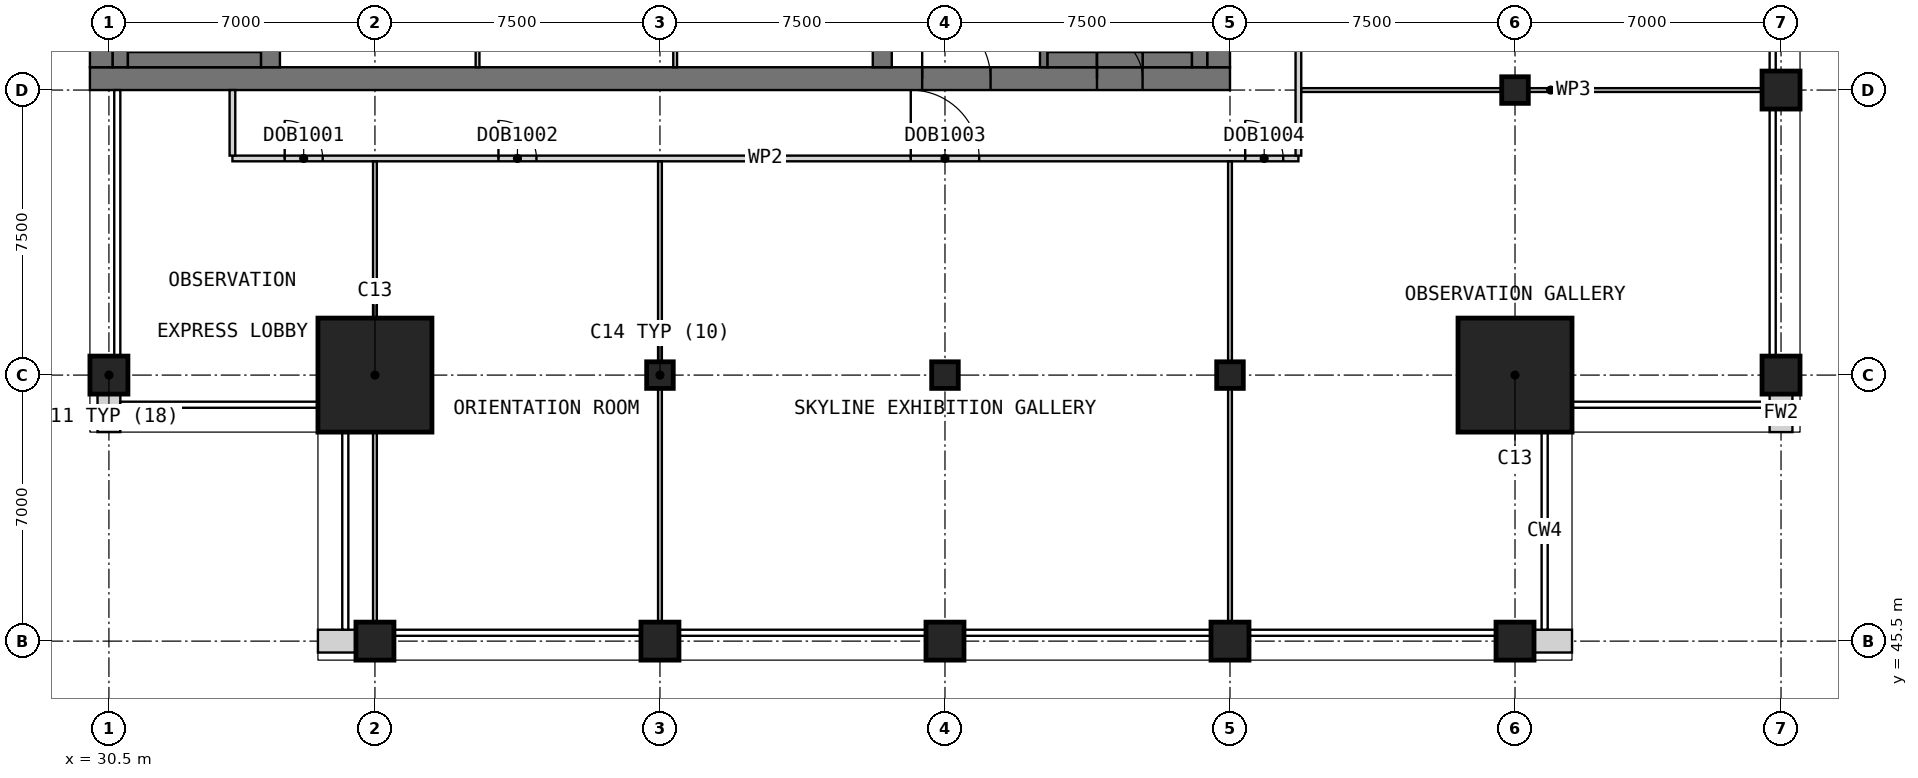
"""IFC4 building model, lengths in metres.
Left out: names, types, materials, properties, quantities, classifications, styles, units other than length and angle.
Written with IfcOpenShell. Run it as: python <this file> out.ifc"""

import sys

from ifc_helpers import new_model, si_unit, direction, frame, frame_2d, origin, origin_2d, place, context, subcontext, project, spatial, rectangle, extrude, element, fill, save


model = new_model("IFC4")
c1 = context("Model", 3, precision=1e-05, world=origin(), true_north=direction((0.0, 1.0)))
c2 = subcontext(c1, "Body", "Model", "MODEL_VIEW")
j1 = project(units=[si_unit("LENGTHUNIT", "METRE"), si_unit("PLANEANGLEUNIT", "RADIAN")], contexts=[c1])
p1 = place(None, origin())
s1 = spatial("IfcSite", under=j1, at=p1, CompositionType="ELEMENT")
p2 = place(p1, origin())
s2 = spatial("IfcBuilding", under=s1, at=p2, CompositionType="ELEMENT")
p3 = place(p2, frame((0.0, 0.0, 302.7)))
s3 = spatial("IfcBuildingStorey", under=s2, at=p3, CompositionType="ELEMENT", Elevation=302.7)
for number, where, z_axis, x_axis in (
    (1, (30.5, 52.5, 0.0), (0.0, 0.0, 1.0), (1.0, 0.0, 0.0)),
    (2, (37.5, 45.5, 0.0), (0.0, 0.0, 1.0), (1.0, 0.0, 0.0)),
    (3, (45.0, 45.5, 0.0), (0.0, 0.0, 1.0), (1.0, 0.0, 0.0)),
):
    element("IfcColumn", number, at=place(p3, frame(where, z_axis=z_axis, x_axis=x_axis)), inside=s3, PredefinedType="COLUMN", context=c2, shape_type="SweptSolid", body=[
        extrude(rectangle(XDim=1.0, YDim=1.0, at=origin_2d()), origin(), (0.0, 0.0, 1.0), 6.0),
    ])
p4 = place(p3, frame((45.0, 52.5, 0.0), z_axis=(0.0, 0.0, 1.0), x_axis=(1.0, 0.0, 0.0)))
e4 = element("IfcColumn", 4, at=p4, inside=s3, PredefinedType="COLUMN", context=c2, shape_type="SweptSolid", body=[
    extrude(rectangle(XDim=0.7, YDim=0.7, at=origin_2d()), origin(), (0.0, 0.0, 1.0), 6.0),
])
p5 = place(p3, frame((52.5, 45.5, 0.0), z_axis=(0.0, 0.0, 1.0), x_axis=(1.0, 0.0, 0.0)))
e5 = element("IfcColumn", 5, at=p5, inside=s3, PredefinedType="COLUMN", context=c2, shape_type="SweptSolid", body=[
    extrude(rectangle(XDim=1.0, YDim=1.0, at=origin_2d()), origin(), (0.0, 0.0, 1.0), 6.0),
])
p6 = place(p3, frame((52.5, 52.5, 0.0), z_axis=(0.0, 0.0, 1.0), x_axis=(1.0, 0.0, 0.0)))
e6 = element("IfcColumn", 6, at=p6, inside=s3, PredefinedType="COLUMN", context=c2, shape_type="SweptSolid", body=[
    extrude(rectangle(XDim=0.7, YDim=0.7, at=origin_2d()), origin(), (0.0, 0.0, 1.0), 6.0),
])
p7 = place(p3, frame((60.0, 45.5, 0.0), z_axis=(0.0, 0.0, 1.0), x_axis=(1.0, 0.0, 0.0)))
e7 = element("IfcColumn", 7, at=p7, inside=s3, PredefinedType="COLUMN", context=c2, shape_type="SweptSolid", body=[
    extrude(rectangle(XDim=1.0, YDim=1.0, at=origin_2d()), origin(), (0.0, 0.0, 1.0), 6.0),
])
p8 = place(p3, frame((60.0, 52.5, 0.0), z_axis=(0.0, 0.0, 1.0), x_axis=(1.0, 0.0, 0.0)))
e8 = element("IfcColumn", 8, at=p8, inside=s3, PredefinedType="COLUMN", context=c2, shape_type="SweptSolid", body=[
    extrude(rectangle(XDim=0.7, YDim=0.7, at=origin_2d()), origin(), (0.0, 0.0, 1.0), 6.0),
])
p9 = place(p3, frame((67.5, 45.5, 0.0), z_axis=(0.0, 0.0, 1.0), x_axis=(1.0, 0.0, 0.0)))
e9 = element("IfcColumn", 9, at=p9, inside=s3, PredefinedType="COLUMN", context=c2, shape_type="SweptSolid", body=[
    extrude(rectangle(XDim=1.0, YDim=1.0, at=origin_2d()), origin(), (0.0, 0.0, 1.0), 6.0),
])
p10 = place(p3, frame((67.5, 60.0, 0.0), z_axis=(0.0, 0.0, 1.0), x_axis=(1.0, 0.0, 0.0)))
e10 = element("IfcColumn", 10, at=p10, inside=s3, PredefinedType="COLUMN", context=c2, shape_type="SweptSolid", body=[
    extrude(rectangle(XDim=0.7, YDim=0.7, at=origin_2d()), origin(), (0.0, 0.0, 1.0), 6.0),
])
for number, where, z_axis, x_axis in (
    (11, (74.5, 52.5, 0.0), (0.0, 0.0, 1.0), (1.0, 0.0, 0.0)),
    (12, (74.5, 60.0, 0.0), (0.0, 0.0, 1.0), (1.0, 0.0, 0.0)),
):
    element("IfcColumn", number, at=place(p3, frame(where, z_axis=z_axis, x_axis=x_axis)), inside=s3, PredefinedType="COLUMN", context=c2, shape_type="SweptSolid", body=[
        extrude(rectangle(XDim=1.0, YDim=1.0, at=origin_2d()), origin(), (0.0, 0.0, 1.0), 6.0),
    ])
for number, where, z_axis, x_axis in (
    (13, (37.5, 52.5, 0.0), (0.0, 0.0, 1.0), (1.0, 0.0, 0.0)),
    (14, (67.5, 52.5, 0.0), (0.0, 0.0, 1.0), (1.0, 0.0, 0.0)),
):
    element("IfcColumn", number, at=place(p3, frame(where, z_axis=z_axis, x_axis=x_axis)), inside=s3, PredefinedType="COLUMN", context=c2, shape_type="SweptSolid", body=[
        extrude(rectangle(XDim=3.0, YDim=3.0, at=origin_2d()), origin(), (0.0, 0.0, 1.0), 6.0),
    ])
p11 = place(p3, frame((30.0, 60.3, 0.0), z_axis=(0.0, 0.0, 1.0), x_axis=(1.0, 0.0, 0.0)))
e15 = element("IfcWall", 15, at=p11, inside=s3, PredefinedType="SHEAR", context=c2, shape_type="SweptSolid", body=[
    extrude(rectangle(XDim=30.0, YDim=0.6, at=frame_2d((15.0, 0.0))), origin(), (0.0, 0.0, 1.0), 6.0),
])
p12 = place(p11, frame((21.9, 0.0, 0.0)))
e16 = element("IfcOpeningElement", 16, at=p12, cuts=e15, PredefinedType="OPENING", context=c2, shape_type="SweptSolid", body=[
    extrude(rectangle(XDim=1.8, YDim=2.1, at=frame_2d((0.9, 1.05))), frame((0.0, 0.31, 0.0), z_axis=(0.0, -1.0, 0.0), x_axis=(1.0, 0.0, 0.0)), (0.0, 0.0, 1.0), 0.62),
])
p13 = place(p11, frame((26.5, 0.0, 0.0)))
e17 = element("IfcOpeningElement", 17, at=p13, cuts=e15, PredefinedType="OPENING", context=c2, shape_type="SweptSolid", body=[
    extrude(rectangle(XDim=1.2, YDim=2.1, at=frame_2d((0.6, 1.05))), frame((0.0, 0.31, 0.0), z_axis=(0.0, -1.0, 0.0), x_axis=(1.0, 0.0, 0.0)), (0.0, 0.0, 1.0), 0.62),
])
p14 = place(p3, frame((30.3, 60.6, 0.0), z_axis=(0.0, 0.0, 1.0), x_axis=(0.0, 1.0, 0.0)))
e18 = element("IfcWall", 18, at=p14, inside=s3, PredefinedType="SHEAR", context=c2, shape_type="SweptSolid", body=[
    extrude(rectangle(XDim=21.3, YDim=0.6, at=frame_2d((10.65, 0.0))), origin(), (0.0, 0.0, 1.0), 6.0),
])
p15 = place(p3, frame((59.7, 60.6, 0.0), z_axis=(0.0, 0.0, 1.0), x_axis=(0.0, 1.0, 0.0)))
e19 = element("IfcWall", 19, at=p15, inside=s3, PredefinedType="SHEAR", context=c2, shape_type="SweptSolid", body=[
    extrude(rectangle(XDim=21.3, YDim=0.6, at=frame_2d((10.65, 0.0))), origin(), (0.0, 0.0, 1.0), 6.0),
])
p16 = place(p15, frame((14.9, 0.0, 0.0)))
e20 = element("IfcOpeningElement", 20, at=p16, cuts=e19, PredefinedType="OPENING", context=c2, shape_type="SweptSolid", body=[
    extrude(rectangle(XDim=1.8, YDim=2.1, at=frame_2d((0.9, 1.05))), frame((0.0, 0.31, 0.0), z_axis=(0.0, -1.0, 0.0), x_axis=(1.0, 0.0, 0.0)), (0.0, 0.0, 1.0), 0.62),
])
for number, where, z_axis, x_axis in (
    (21, (34.75, 60.6, 0.0), (0.0, 0.0, 1.0), (0.0, 1.0, 0.0)),
    (22, (50.85, 60.6, 0.0), (0.0, 0.0, 1.0), (0.0, 1.0, 0.0)),
):
    element("IfcWall", number, at=place(p3, frame(where, z_axis=z_axis, x_axis=x_axis)), inside=s3, PredefinedType="SHEAR", context=c2, shape_type="SweptSolid", body=[
        extrude(rectangle(XDim=3.6, YDim=0.5, at=frame_2d((1.8, 0.0))), origin(), (0.0, 0.0, 1.0), 6.0),
    ])
for number, where, z_axis, x_axis in (
    (23, (36.0, 45.5, 0.0), (0.0, 0.0, 1.0), (1.0, 0.0, 0.0)),
    (24, (68.0, 45.5, 0.0), (0.0, 0.0, 1.0), (1.0, 0.0, 0.0)),
    (25, (74.5, 51.0, 0.0), (0.0, 0.0, 1.0), (0.0, 1.0, 0.0)),
    (26, (30.5, 52.0, 0.0), (0.0, 0.0, 1.0), (0.0, -1.0, 0.0)),
):
    element("IfcWall", number, at=place(p3, frame(where, z_axis=z_axis, x_axis=x_axis)), inside=s3, PredefinedType="SOLIDWALL", context=c2, shape_type="SweptSolid", body=[
        extrude(rectangle(XDim=1.0, YDim=0.6, at=frame_2d((0.5, 0.0))), origin(), (0.0, 0.0, 1.0), 5.7),
    ])
for number, where, z_axis, x_axis in (
    (27, (40.2, 60.6, 0.0), (0.0, 0.0, 1.0), (0.0, 1.0, 0.0)),
    (28, (45.4, 60.6, 0.0), (0.0, 0.0, 1.0), (0.0, 1.0, 0.0)),
):
    element("IfcWall", number, at=place(p3, frame(where, z_axis=z_axis, x_axis=x_axis)), inside=s3, PredefinedType="PARTITIONING", context=c2, shape_type="SweptSolid", body=[
        extrude(rectangle(XDim=3.4, YDim=0.1, at=frame_2d((1.7, 0.0))), origin(), (0.0, 0.0, 1.0), 5.7),
    ])
p17 = place(p3, frame((55.1, 60.6, 0.0), z_axis=(0.0, 0.0, 1.0), x_axis=(0.0, 1.0, 0.0)))
e29 = element("IfcWall", 29, at=p17, inside=s3, PredefinedType="SOLIDWALL", context=c2, shape_type="SweptSolid", body=[
    extrude(rectangle(XDim=8.0, YDim=0.2, at=frame_2d((4.0, 0.0))), origin(), (0.0, 0.0, 1.0), 5.7),
])
p18 = place(p3, frame((30.8, 60.6, 0.0), z_axis=(0.0, 0.0, 1.0), x_axis=(0.0, 1.0, 0.0)))
e30 = element("IfcWall", 30, at=p18, inside=s3, PredefinedType="SOLIDWALL", context=c2, shape_type="SweptSolid", body=[
    extrude(rectangle(XDim=21.3, YDim=0.4, at=frame_2d((10.65, 0.0))), origin(), (0.0, 0.0, 1.0), 5.7),
])
p19 = place(p3, frame((31.0, 60.8, 0.0), z_axis=(0.0, 0.0, 1.0), x_axis=(1.0, 0.0, 0.0)))
e31 = element("IfcWall", 31, at=p19, inside=s3, PredefinedType="SOLIDWALL", context=c2, shape_type="SweptSolid", body=[
    extrude(rectangle(XDim=3.5, YDim=0.4, at=frame_2d((1.75, 0.0))), origin(), (0.0, 0.0, 1.0), 5.7),
])
for number, where, z_axis, x_axis in (
    (32, (55.2, 60.8, 0.0), (0.0, 0.0, 1.0), (1.0, 0.0, 0.0)),
    (33, (57.7, 60.8, 0.0), (0.0, 0.0, 1.0), (1.0, 0.0, 0.0)),
):
    element("IfcWall", number, at=place(p3, frame(where, z_axis=z_axis, x_axis=x_axis)), inside=s3, PredefinedType="SOLIDWALL", context=c2, shape_type="SweptSolid", body=[
        extrude(rectangle(XDim=1.3, YDim=0.4, at=frame_2d((0.65, 0.0))), origin(), (0.0, 0.0, 1.0), 5.7),
    ])
p20 = place(p3, frame((59.2, 60.6, 0.0), z_axis=(0.0, 0.0, 1.0), x_axis=(0.0, 1.0, 0.0)))
e34 = element("IfcWall", 34, at=p20, inside=s3, PredefinedType="SOLIDWALL", context=c2, shape_type="SweptSolid", body=[
    extrude(rectangle(XDim=7.9, YDim=0.4, at=frame_2d((3.95, 0.0))), origin(), (0.0, 0.0, 1.0), 5.7),
])
p21 = place(p3, frame((56.5, 60.8, 3.2), z_axis=(0.0, 0.0, 1.0), x_axis=(1.0, 0.0, 0.0)))
e35 = element("IfcWall", 35, at=p21, inside=s3, PredefinedType="SOLIDWALL", context=c2, shape_type="SweptSolid", body=[
    extrude(rectangle(XDim=1.2, YDim=0.4, at=frame_2d((0.6, 0.0))), origin(), (0.0, 0.0, 1.0), 2.5),
])
p22 = place(p3, frame((33.75, 58.2, 0.0), z_axis=(0.0, 0.0, 1.0), x_axis=(1.0, 0.0, 0.0)))
e36 = element("IfcWall", 36, at=p22, inside=s3, PredefinedType="PARTITIONING", context=c2, shape_type="SweptSolid", body=[
    extrude(rectangle(XDim=28.05, YDim=0.15, at=frame_2d((14.025, 0.0))), origin(), (0.0, 0.0, 1.0), 5.7),
])
p23 = place(p22, frame((1.375, 0.0, 0.0)))
e37 = element("IfcOpeningElement", 37, at=p23, cuts=e36, PredefinedType="OPENING", context=c2, shape_type="SweptSolid", body=[
    extrude(rectangle(XDim=1.0, YDim=2.1, at=frame_2d((0.5, 1.05))), frame((0.0, 0.085, 0.0), z_axis=(0.0, -1.0, 0.0), x_axis=(1.0, 0.0, 0.0)), (0.0, 0.0, 1.0), 0.17),
])
p24 = place(p22, frame((7.0, 0.0, 0.0)))
e38 = element("IfcOpeningElement", 38, at=p24, cuts=e36, PredefinedType="OPENING", context=c2, shape_type="SweptSolid", body=[
    extrude(rectangle(XDim=1.0, YDim=2.1, at=frame_2d((0.5, 1.05))), frame((0.0, 0.085, 0.0), z_axis=(0.0, -1.0, 0.0), x_axis=(1.0, 0.0, 0.0)), (0.0, 0.0, 1.0), 0.17),
])
p25 = place(p22, frame((17.85, 0.0, 0.0)))
e39 = element("IfcOpeningElement", 39, at=p25, cuts=e36, PredefinedType="OPENING", context=c2, shape_type="SweptSolid", body=[
    extrude(rectangle(XDim=1.8, YDim=2.1, at=frame_2d((0.9, 1.05))), frame((0.0, 0.085, 0.0), z_axis=(0.0, -1.0, 0.0), x_axis=(1.0, 0.0, 0.0)), (0.0, 0.0, 1.0), 0.17),
])
p26 = place(p22, frame((26.65, 0.0, 0.0)))
e40 = element("IfcOpeningElement", 40, at=p26, cuts=e36, PredefinedType="OPENING", context=c2, shape_type="SweptSolid", body=[
    extrude(rectangle(XDim=1.0, YDim=2.1, at=frame_2d((0.5, 1.05))), frame((0.0, 0.085, 0.0), z_axis=(0.0, -1.0, 0.0), x_axis=(1.0, 0.0, 0.0)), (0.0, 0.0, 1.0), 0.17),
])
p27 = place(p3, frame((33.75, 58.275, 0.0), z_axis=(0.0, 0.0, 1.0), x_axis=(0.0, 1.0, 0.0)))
e41 = element("IfcWall", 41, at=p27, inside=s3, PredefinedType="PARTITIONING", context=c2, shape_type="SweptSolid", body=[
    extrude(rectangle(XDim=1.725, YDim=0.15, at=frame_2d((0.863, 0.0))), origin(), (0.0, 0.0, 1.0), 5.7),
])
p28 = place(p3, frame((61.8, 58.275, 0.0), z_axis=(0.0, 0.0, 1.0), x_axis=(0.0, 1.0, 0.0)))
e42 = element("IfcWall", 42, at=p28, inside=s3, PredefinedType="PARTITIONING", context=c2, shape_type="SweptSolid", body=[
    extrude(rectangle(XDim=25.95, YDim=0.15, at=frame_2d((12.975, 0.0))), origin(), (0.0, 0.0, 1.0), 5.7),
])
p29 = place(p28, frame((4.975, 0.0, 0.0)))
e43 = element("IfcOpeningElement", 43, at=p29, cuts=e42, PredefinedType="OPENING", context=c2, shape_type="SweptSolid", body=[
    extrude(rectangle(XDim=1.0, YDim=2.1, at=frame_2d((0.5, 1.05))), frame((0.0, 0.085, 0.0), z_axis=(0.0, -1.0, 0.0), x_axis=(1.0, 0.0, 0.0)), (0.0, 0.0, 1.0), 0.17),
])
p30 = place(p28, frame((13.95, 0.0, 0.0)))
e44 = element("IfcOpeningElement", 44, at=p30, cuts=e42, PredefinedType="OPENING", context=c2, shape_type="SweptSolid", body=[
    extrude(rectangle(XDim=1.8, YDim=2.1, at=frame_2d((0.9, 1.05))), frame((0.0, 0.085, 0.0), z_axis=(0.0, -1.0, 0.0), x_axis=(1.0, 0.0, 0.0)), (0.0, 0.0, 1.0), 0.17),
])
p31 = place(p28, frame((21.85, 0.0, 0.0)))
e45 = element("IfcOpeningElement", 45, at=p31, cuts=e42, PredefinedType="OPENING", context=c2, shape_type="SweptSolid", body=[
    extrude(rectangle(XDim=1.0, YDim=2.1, at=frame_2d((0.5, 1.05))), frame((0.0, 0.085, 0.0), z_axis=(0.0, -1.0, 0.0), x_axis=(1.0, 0.0, 0.0)), (0.0, 0.0, 1.0), 0.17),
])
p32 = place(p3, frame((61.875, 60.0, 0.0), z_axis=(0.0, 0.0, 1.0), x_axis=(1.0, 0.0, 0.0)))
e46 = element("IfcWall", 46, at=p32, inside=s3, PredefinedType="PARTITIONING", context=c2, shape_type="SweptSolid", body=[
    extrude(rectangle(XDim=13.125, YDim=0.1, at=frame_2d((6.562, 0.0))), origin(), (0.0, 0.0, 1.0), 5.7),
])
p33 = place(p3, frame((37.5, 45.0, 0.0), z_axis=(0.0, 0.0, 1.0), x_axis=(0.0, 1.0, 0.0)))
e47 = element("IfcWall", 47, at=p33, inside=s3, PredefinedType="PARTITIONING", context=c2, shape_type="SweptSolid", body=[
    extrude(rectangle(XDim=13.125, YDim=0.1, at=frame_2d((6.562, 0.0))), origin(), (0.0, 0.0, 1.0), 5.25),
])
for number, where, z_axis, x_axis in (
    (48, (45.0, 45.0, 0.0), (0.0, 0.0, 1.0), (0.0, 1.0, 0.0)),
    (49, (60.0, 45.0, 0.0), (0.0, 0.0, 1.0), (0.0, 1.0, 0.0)),
):
    element("IfcWall", number, at=place(p3, frame(where, z_axis=z_axis, x_axis=x_axis)), inside=s3, PredefinedType="PARTITIONING", context=c2, shape_type="SweptSolid", body=[
        extrude(rectangle(XDim=13.125, YDim=0.1, at=frame_2d((6.562, 0.0))), origin(), (0.0, 0.0, 1.0), 5.7),
    ])
p34 = place(p12, origin())
e50 = element("IfcDoor", 50, at=p34, inside=s3, OperationType="DOUBLE_DOOR_SINGLE_SWING", PredefinedType="DOOR", context=c2, shape_type="SweptSolid", body=[
    extrude(rectangle(XDim=1.8, YDim=2.1, at=frame_2d((0.9, 1.05))), frame((0.0, 0.025, 0.0), z_axis=(0.0, -1.0, 0.0), x_axis=(1.0, 0.0, 0.0)), (0.0, 0.0, 1.0), 0.05),
])
fill(e16, e50)
p35 = place(p13, origin())
e51 = element("IfcDoor", 51, at=p35, inside=s3, OperationType="SINGLE_SWING_LEFT", PredefinedType="DOOR", context=c2, shape_type="SweptSolid", body=[
    extrude(rectangle(XDim=1.2, YDim=2.1, at=frame_2d((0.6, 1.05))), frame((0.0, 0.025, 0.0), z_axis=(0.0, -1.0, 0.0), x_axis=(1.0, 0.0, 0.0)), (0.0, 0.0, 1.0), 0.05),
])
fill(e17, e51)
p36 = place(p23, origin())
e52 = element("IfcDoor", 52, at=p36, inside=s3, OperationType="SINGLE_SWING_RIGHT", PredefinedType="DOOR", context=c2, shape_type="SweptSolid", body=[
    extrude(rectangle(XDim=1.0, YDim=2.1, at=frame_2d((0.5, 1.05))), frame((0.0, 0.025, 0.0), z_axis=(0.0, -1.0, 0.0), x_axis=(1.0, 0.0, 0.0)), (0.0, 0.0, 1.0), 0.05),
])
fill(e37, e52)
p37 = place(p24, origin())
e53 = element("IfcDoor", 53, at=p37, inside=s3, OperationType="SINGLE_SWING_RIGHT", PredefinedType="DOOR", context=c2, shape_type="SweptSolid", body=[
    extrude(rectangle(XDim=1.0, YDim=2.1, at=frame_2d((0.5, 1.05))), frame((0.0, 0.025, 0.0), z_axis=(0.0, -1.0, 0.0), x_axis=(1.0, 0.0, 0.0)), (0.0, 0.0, 1.0), 0.05),
])
fill(e38, e53)
p38 = place(p25, origin())
e54 = element("IfcDoor", 54, at=p38, inside=s3, OperationType="DOUBLE_DOOR_SINGLE_SWING", PredefinedType="DOOR", context=c2, shape_type="SweptSolid", body=[
    extrude(rectangle(XDim=1.8, YDim=2.1, at=frame_2d((0.9, 1.05))), frame((0.0, 0.025, 0.0), z_axis=(0.0, -1.0, 0.0), x_axis=(1.0, 0.0, 0.0)), (0.0, 0.0, 1.0), 0.05),
])
fill(e39, e54)
p39 = place(p26, origin())
e55 = element("IfcDoor", 55, at=p39, inside=s3, OperationType="SINGLE_SWING_RIGHT", PredefinedType="DOOR", context=c2, shape_type="SweptSolid", body=[
    extrude(rectangle(XDim=1.0, YDim=2.1, at=frame_2d((0.5, 1.05))), frame((0.0, 0.025, 0.0), z_axis=(0.0, -1.0, 0.0), x_axis=(1.0, 0.0, 0.0)), (0.0, 0.0, 1.0), 0.05),
])
fill(e40, e55)
save(model, sys.argv[1])
